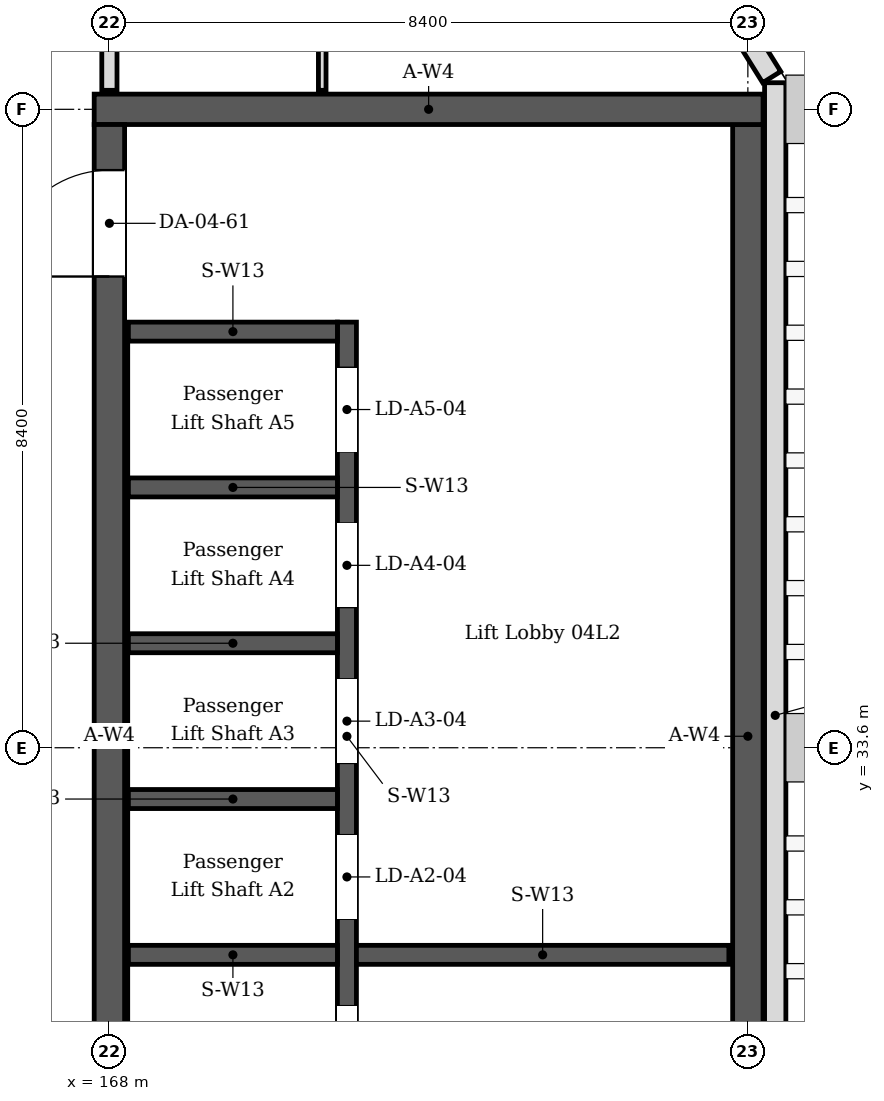
"""IFC4 building model, lengths in metres.
Left out: names, types, materials, properties, quantities, classifications, styles, units other than length and angle.
Written with IfcOpenShell. Run it as: python <this file> out.ifc"""

import sys

from ifc_helpers import new_model, si_unit, direction, frame, frame_2d, origin, place, context, subcontext, project, spatial, rectangle, extrude, element, fill, save


model = new_model("IFC4")
c1 = context("Model", 3, precision=1e-05, world=origin(), true_north=direction((0.0, 1.0)))
c2 = subcontext(c1, "Body", "Model", "MODEL_VIEW")
j1 = project(units=[si_unit("LENGTHUNIT", "METRE"), si_unit("PLANEANGLEUNIT", "RADIAN")], contexts=[c1])
p1 = place(None, origin())
s1 = spatial("IfcSite", under=j1, at=p1, CompositionType="ELEMENT")
p2 = place(p1, origin())
s2 = spatial("IfcBuilding", under=s1, at=p2, CompositionType="ELEMENT")
p3 = place(p2, frame((0.0, 0.0, 18.6)))
s3 = spatial("IfcBuildingStorey", under=s2, at=p3, CompositionType="ELEMENT", Elevation=18.6)
p4 = place(p3, frame((167.8, 42.0, 0.0), z_axis=(0.0, 0.0, 1.0), x_axis=(1.0, 0.0, 0.0)))
e1 = element("IfcWall", 1, at=p4, inside=s3, PredefinedType="SOLIDWALL", context=c2, shape_type="SweptSolid", body=[
    extrude(rectangle(XDim=8.8, YDim=0.4, at=frame_2d((4.4, 0.0))), origin(), (0.0, 0.0, 1.0), 4.05),
])
p5 = place(p3, frame((168.0, 25.4, 0.0), z_axis=(0.0, 0.0, 1.0), x_axis=(0.0, 1.0, 0.0)))
e2 = element("IfcWall", 2, at=p5, inside=s3, PredefinedType="SOLIDWALL", context=c2, shape_type="SweptSolid", body=[
    extrude(rectangle(XDim=16.4, YDim=0.4, at=frame_2d((8.2, 0.0))), origin(), (0.0, 0.0, 1.0), 4.05),
])
p6 = place(p5, frame((1.0, 0.0, 0.0)))
e3 = element("IfcOpeningElement", 3, at=p6, cuts=e2, PredefinedType="OPENING", context=c2, shape_type="SweptSolid", body=[
    extrude(rectangle(XDim=1.0, YDim=2.1, at=frame_2d((0.5, 1.05))), frame((0.0, 0.21, 0.0), z_axis=(0.0, -1.0, 0.0), x_axis=(1.0, 0.0, 0.0)), (0.0, 0.0, 1.0), 0.42),
])
p7 = place(p5, frame((14.4, 0.0, 0.0)))
e4 = element("IfcOpeningElement", 4, at=p7, cuts=e2, PredefinedType="OPENING", context=c2, shape_type="SweptSolid", body=[
    extrude(rectangle(XDim=1.4, YDim=2.1, at=frame_2d((0.7, 1.05))), frame((0.0, 0.21, 0.0), z_axis=(0.0, -1.0, 0.0), x_axis=(1.0, 0.0, 0.0)), (0.0, 0.0, 1.0), 0.42),
])
p8 = place(p3, frame((176.4, 25.4, 0.0), z_axis=(0.0, 0.0, 1.0), x_axis=(0.0, 1.0, 0.0)))
e5 = element("IfcWall", 5, at=p8, inside=s3, PredefinedType="SOLIDWALL", context=c2, shape_type="SweptSolid", body=[
    extrude(rectangle(XDim=16.4, YDim=0.4, at=frame_2d((8.2, 0.0))), origin(), (0.0, 0.0, 1.0), 4.05),
])
p9 = place(p3, frame((176.76, -0.22, 0.0), z_axis=(0.0, 0.0, 1.0), x_axis=(0.0, 1.0, 0.0)))
e6 = element("IfcWall", 6, at=p9, inside=s3, PredefinedType="SOLIDWALL", context=c2, shape_type="SweptSolid", body=[
    extrude(rectangle(XDim=42.57, YDim=0.28, at=frame_2d((21.285, 0.0))), origin(), (0.0, 0.0, 1.0), 4.05),
])
p10 = place(p9, frame((9.46, 0.0, 0.6)))
e7 = element("IfcOpeningElement", 7, at=p10, cuts=e6, PredefinedType="OPENING", context=c2, shape_type="SweptSolid", body=[
    extrude(rectangle(XDim=2.52, YDim=2.4, at=frame_2d((1.26, 1.2))), frame((0.0, 0.15, 0.0), z_axis=(0.0, -1.0, 0.0), x_axis=(1.0, 0.0, 0.0)), (0.0, 0.0, 1.0), 0.3),
])
p11 = place(p9, frame((13.66, 0.0, 0.6)))
e8 = element("IfcOpeningElement", 8, at=p11, cuts=e6, PredefinedType="OPENING", context=c2, shape_type="SweptSolid", body=[
    extrude(rectangle(XDim=2.52, YDim=2.4, at=frame_2d((1.26, 1.2))), frame((0.0, 0.15, 0.0), z_axis=(0.0, -1.0, 0.0), x_axis=(1.0, 0.0, 0.0)), (0.0, 0.0, 1.0), 0.3),
])
p12 = place(p9, frame((17.86, 0.0, 0.6)))
e9 = element("IfcOpeningElement", 9, at=p12, cuts=e6, PredefinedType="OPENING", context=c2, shape_type="SweptSolid", body=[
    extrude(rectangle(XDim=2.52, YDim=2.4, at=frame_2d((1.26, 1.2))), frame((0.0, 0.15, 0.0), z_axis=(0.0, -1.0, 0.0), x_axis=(1.0, 0.0, 0.0)), (0.0, 0.0, 1.0), 0.3),
])
p13 = place(p9, frame((22.06, 0.0, 0.6)))
e10 = element("IfcOpeningElement", 10, at=p13, cuts=e6, PredefinedType="OPENING", context=c2, shape_type="SweptSolid", body=[
    extrude(rectangle(XDim=2.52, YDim=2.4, at=frame_2d((1.26, 1.2))), frame((0.0, 0.15, 0.0), z_axis=(0.0, -1.0, 0.0), x_axis=(1.0, 0.0, 0.0)), (0.0, 0.0, 1.0), 0.3),
])
p14 = place(p3, frame((176.714, 42.424, 0.0), z_axis=(0.0, 0.0, 1.0), x_axis=(-0.529018946142, 0.848610013271, 0.0)))
e11 = element("IfcWall", 11, at=p14, inside=s3, PredefinedType="SOLIDWALL", context=c2, shape_type="SweptSolid", body=[
    extrude(rectangle(XDim=4.144, YDim=0.28, at=frame_2d((2.072, 0.0))), origin(), (0.0, 0.0, 1.0), 4.05),
])
p15 = place(p14, frame((0.812, 0.0, 0.6)))
e12 = element("IfcOpeningElement", 12, at=p15, cuts=e11, PredefinedType="OPENING", context=c2, shape_type="SweptSolid", body=[
    extrude(rectangle(XDim=2.52, YDim=2.4, at=frame_2d((1.26, 1.2))), frame((0.0, 0.15, 0.0), z_axis=(0.0, -1.0, 0.0), x_axis=(1.0, 0.0, 0.0)), (0.0, 0.0, 1.0), 0.3),
])
p16 = place(p3, frame((170.8, 42.25, 0.0), z_axis=(0.0, 0.0, 1.0), x_axis=(0.0, 1.0, 0.0)))
e13 = element("IfcWall", 13, at=p16, inside=s3, PredefinedType="PARTITIONING", context=c2, shape_type="SweptSolid", body=[
    extrude(rectangle(XDim=2.15, YDim=0.1, at=frame_2d((1.075, 0.0))), origin(), (0.0, 0.0, 1.0), 4.05),
])
p17 = place(p3, frame((168.0, 42.25, 0.0), z_axis=(0.0, 0.0, 1.0), x_axis=(0.0, 1.0, 0.0)))
e14 = element("IfcWall", 14, at=p17, inside=s3, PredefinedType="PARTITIONING", context=c2, shape_type="SweptSolid", body=[
    extrude(rectangle(XDim=7.943, YDim=0.2, at=frame_2d((3.972, 0.0))), origin(), (0.0, 0.0, 1.0), 3.45),
])
p18 = place(p17, frame((2.6, 0.0, 0.0)))
e15 = element("IfcOpeningElement", 15, at=p18, cuts=e14, PredefinedType="OPENING", context=c2, shape_type="SweptSolid", body=[
    extrude(rectangle(XDim=0.9, YDim=2.1, at=frame_2d((0.45, 1.05))), frame((0.0, 0.11, 0.0), z_axis=(0.0, -1.0, 0.0), x_axis=(1.0, 0.0, 0.0)), (0.0, 0.0, 1.0), 0.22),
])
p19 = place(p17, frame((4.4, 0.0, 0.0)))
e16 = element("IfcOpeningElement", 16, at=p19, cuts=e14, PredefinedType="OPENING", context=c2, shape_type="SweptSolid", body=[
    extrude(rectangle(XDim=0.9, YDim=2.1, at=frame_2d((0.45, 1.05))), frame((0.0, 0.11, 0.0), z_axis=(0.0, -1.0, 0.0), x_axis=(1.0, 0.0, 0.0)), (0.0, 0.0, 1.0), 0.22),
])
p20 = place(p3, frame((171.125, 28.3, 0.0), z_axis=(0.0, 0.0, 1.0), x_axis=(0.0, 1.0, 0.0)))
e17 = element("IfcWall", 17, at=p20, inside=s3, PredefinedType="SOLIDWALL", context=c2, shape_type="SweptSolid", body=[
    extrude(rectangle(XDim=10.9, YDim=0.25, at=frame_2d((5.45, 0.0))), origin(), (0.0, 0.0, 1.0), 4.05),
])
p21 = place(p20, frame((0.8, 0.0, 0.0)))
e18 = element("IfcOpeningElement", 18, at=p21, cuts=e17, PredefinedType="OPENING", context=c2, shape_type="SweptSolid", body=[
    extrude(rectangle(XDim=1.1, YDim=2.1, at=frame_2d((0.55, 1.05))), frame((0.0, 0.135, 0.0), z_axis=(0.0, -1.0, 0.0), x_axis=(1.0, 0.0, 0.0)), (0.0, 0.0, 1.0), 0.27),
])
p22 = place(p20, frame((3.05, 0.0, 0.0)))
e19 = element("IfcOpeningElement", 19, at=p22, cuts=e17, PredefinedType="OPENING", context=c2, shape_type="SweptSolid", body=[
    extrude(rectangle(XDim=1.1, YDim=2.1, at=frame_2d((0.55, 1.05))), frame((0.0, 0.135, 0.0), z_axis=(0.0, -1.0, 0.0), x_axis=(1.0, 0.0, 0.0)), (0.0, 0.0, 1.0), 0.27),
])
p23 = place(p20, frame((5.1, 0.0, 0.0)))
e20 = element("IfcOpeningElement", 20, at=p23, cuts=e17, PredefinedType="OPENING", context=c2, shape_type="SweptSolid", body=[
    extrude(rectangle(XDim=1.1, YDim=2.1, at=frame_2d((0.55, 1.05))), frame((0.0, 0.135, 0.0), z_axis=(0.0, -1.0, 0.0), x_axis=(1.0, 0.0, 0.0)), (0.0, 0.0, 1.0), 0.27),
])
p24 = place(p20, frame((7.15, 0.0, 0.0)))
e21 = element("IfcOpeningElement", 21, at=p24, cuts=e17, PredefinedType="OPENING", context=c2, shape_type="SweptSolid", body=[
    extrude(rectangle(XDim=1.1, YDim=2.1, at=frame_2d((0.55, 1.05))), frame((0.0, 0.135, 0.0), z_axis=(0.0, -1.0, 0.0), x_axis=(1.0, 0.0, 0.0)), (0.0, 0.0, 1.0), 0.27),
])
p25 = place(p20, frame((9.2, 0.0, 0.0)))
e22 = element("IfcOpeningElement", 22, at=p25, cuts=e17, PredefinedType="OPENING", context=c2, shape_type="SweptSolid", body=[
    extrude(rectangle(XDim=1.1, YDim=2.1, at=frame_2d((0.55, 1.05))), frame((0.0, 0.135, 0.0), z_axis=(0.0, -1.0, 0.0), x_axis=(1.0, 0.0, 0.0)), (0.0, 0.0, 1.0), 0.27),
])
for number, where, z_axis, x_axis in (
    (23, (168.25, 30.875, 0.0), (0.0, 0.0, 1.0), (1.0, 0.0, 0.0)),
    (24, (168.25, 32.925, 0.0), (0.0, 0.0, 1.0), (1.0, 0.0, 0.0)),
    (25, (168.25, 34.975, 0.0), (0.0, 0.0, 1.0), (1.0, 0.0, 0.0)),
    (26, (168.25, 37.025, 0.0), (0.0, 0.0, 1.0), (1.0, 0.0, 0.0)),
    (27, (168.25, 39.075, 0.0), (0.0, 0.0, 1.0), (1.0, 0.0, 0.0)),
):
    element("IfcWall", number, at=place(p3, frame(where, z_axis=z_axis, x_axis=x_axis)), inside=s3, PredefinedType="SOLIDWALL", context=c2, shape_type="SweptSolid", body=[
        extrude(rectangle(XDim=2.75, YDim=0.25, at=frame_2d((1.375, 0.0))), origin(), (0.0, 0.0, 1.0), 4.05),
    ])
p26 = place(p3, frame((171.25, 30.875, 0.0), z_axis=(0.0, 0.0, 1.0), x_axis=(1.0, 0.0, 0.0)))
e28 = element("IfcWall", 28, at=p26, inside=s3, PredefinedType="SOLIDWALL", context=c2, shape_type="SweptSolid", body=[
    extrude(rectangle(XDim=4.9, YDim=0.25, at=frame_2d((2.45, 0.0))), origin(), (0.0, 0.0, 1.0), 4.05),
])
p27 = place(p21, origin())
e29 = element("IfcDoor", 29, at=p27, inside=s3, OperationType="SLIDING_TO_LEFT", PredefinedType="DOOR", context=c2, shape_type="SweptSolid", body=[
    extrude(rectangle(XDim=1.1, YDim=2.1, at=frame_2d((0.55, 1.05))), frame((0.0, 0.025, 0.0), z_axis=(0.0, -1.0, 0.0), x_axis=(1.0, 0.0, 0.0)), (0.0, 0.0, 1.0), 0.05),
])
fill(e18, e29)
p28 = place(p22, origin())
e30 = element("IfcDoor", 30, at=p28, inside=s3, OperationType="SLIDING_TO_LEFT", PredefinedType="DOOR", context=c2, shape_type="SweptSolid", body=[
    extrude(rectangle(XDim=1.1, YDim=2.1, at=frame_2d((0.55, 1.05))), frame((0.0, 0.025, 0.0), z_axis=(0.0, -1.0, 0.0), x_axis=(1.0, 0.0, 0.0)), (0.0, 0.0, 1.0), 0.05),
])
fill(e19, e30)
p29 = place(p23, origin())
e31 = element("IfcDoor", 31, at=p29, inside=s3, OperationType="SLIDING_TO_LEFT", PredefinedType="DOOR", context=c2, shape_type="SweptSolid", body=[
    extrude(rectangle(XDim=1.1, YDim=2.1, at=frame_2d((0.55, 1.05))), frame((0.0, 0.025, 0.0), z_axis=(0.0, -1.0, 0.0), x_axis=(1.0, 0.0, 0.0)), (0.0, 0.0, 1.0), 0.05),
])
fill(e20, e31)
p30 = place(p24, origin())
e32 = element("IfcDoor", 32, at=p30, inside=s3, OperationType="SLIDING_TO_LEFT", PredefinedType="DOOR", context=c2, shape_type="SweptSolid", body=[
    extrude(rectangle(XDim=1.1, YDim=2.1, at=frame_2d((0.55, 1.05))), frame((0.0, 0.025, 0.0), z_axis=(0.0, -1.0, 0.0), x_axis=(1.0, 0.0, 0.0)), (0.0, 0.0, 1.0), 0.05),
])
fill(e21, e32)
p31 = place(p25, origin())
e33 = element("IfcDoor", 33, at=p31, inside=s3, OperationType="SLIDING_TO_LEFT", PredefinedType="DOOR", context=c2, shape_type="SweptSolid", body=[
    extrude(rectangle(XDim=1.1, YDim=2.1, at=frame_2d((0.55, 1.05))), frame((0.0, 0.025, 0.0), z_axis=(0.0, -1.0, 0.0), x_axis=(1.0, 0.0, 0.0)), (0.0, 0.0, 1.0), 0.05),
])
fill(e22, e33)
p32 = place(p7, origin())
e34 = element("IfcDoor", 34, at=p32, inside=s3, OperationType="DOUBLE_DOOR_DOUBLE_SWING", PredefinedType="DOOR", context=c2, shape_type="SweptSolid", body=[
    extrude(rectangle(XDim=1.4, YDim=2.1, at=frame_2d((0.7, 1.05))), frame((0.0, 0.025, 0.0), z_axis=(0.0, -1.0, 0.0), x_axis=(1.0, 0.0, 0.0)), (0.0, 0.0, 1.0), 0.05),
])
fill(e4, e34)
save(model, sys.argv[1])
